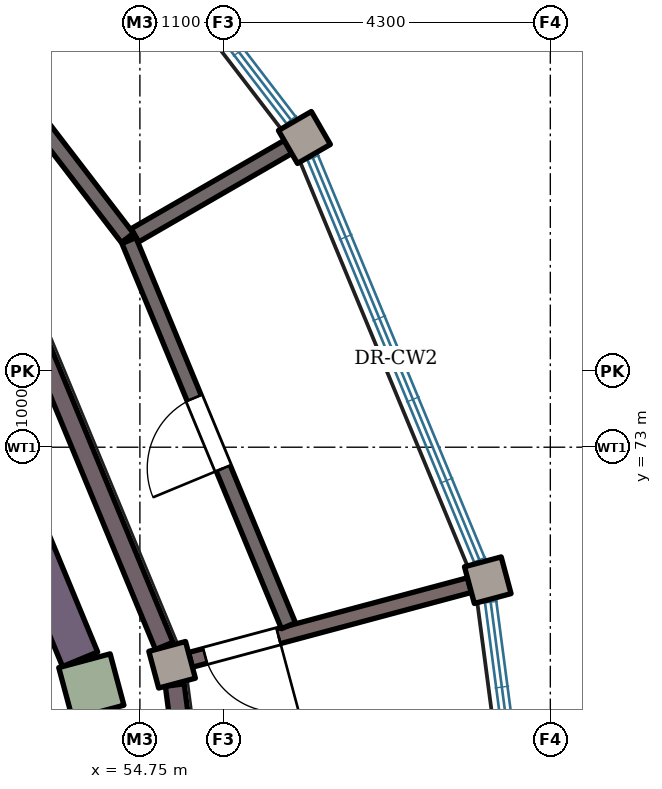
"""IFC4 building model, lengths in metres.
Left out: names, types, materials, properties, quantities, classifications, styles, units other than length and angle.
Written with IfcOpenShell. Run it as: python <this file> out.ifc"""

import sys

from ifc_helpers import new_model, si_unit, direction, frame, frame_2d, origin, origin_2d, place, context, subcontext, project, spatial, rectangle, extrude, element, fill, save


model = new_model("IFC4")
c1 = context("Model", 3, precision=1e-05, world=origin(), true_north=direction((0.0, 1.0)))
c2 = subcontext(c1, "Body", "Model", "MODEL_VIEW")
j1 = project(units=[si_unit("LENGTHUNIT", "METRE"), si_unit("PLANEANGLEUNIT", "RADIAN")], contexts=[c1])
p1 = place(None, origin())
s1 = spatial("IfcSite", under=j1, at=p1, CompositionType="ELEMENT")
p2 = place(p1, origin())
s2 = spatial("IfcBuilding", under=s1, at=p2, CompositionType="ELEMENT")
p3 = place(p2, frame((0.0, 0.0, 4.2)))
s3 = spatial("IfcBuildingStorey", under=s2, at=p3, CompositionType="ELEMENT", Elevation=4.2)
p4 = place(p3, frame((54.111, 69.853, 0.0), z_axis=(0.0, 0.0, 1.0), x_axis=(0.965925826289, 0.258819045103, 0.0)))
e1 = element("IfcColumn", 1, at=p4, inside=s3, PredefinedType="COLUMN", context=c2, shape_type="SweptSolid", body=[
    extrude(rectangle(XDim=0.7, YDim=0.7, at=origin_2d()), origin(), (0.0, 0.0, 1.0), 4.2),
])
p5 = place(p3, frame((53.963, 70.21, 0.0), z_axis=(0.0, 0.0, 1.0), x_axis=(-0.382688328955, 0.923877504262, 0.0)))
e2 = element("IfcWall", 2, at=p5, inside=s3, PredefinedType="SHEAR", context=c2, shape_type="SweptSolid", body=[
    extrude(rectangle(XDim=4.122, YDim=0.5, at=frame_2d((2.061, 0.0))), origin(), (0.0, 0.0, 1.0), 3.4),
])
for number, where, z_axis, x_axis in (
    (3, (55.174, 70.137, 0.0), (0.0, 0.0, 1.0), (0.966, 0.259, 0.0)),
    (4, (59.327, 71.25, 0.0), (0.0, 0.0, 1.0), (0.966, 0.259, 0.0)),
    (5, (56.915, 77.075, 0.0), (0.0, 0.0, 1.0), (0.866, 0.5, 0.0)),
):
    element("IfcColumn", number, at=place(p3, frame(where, z_axis=z_axis, x_axis=x_axis)), inside=s3, PredefinedType="COLUMN", context=c2, shape_type="SweptSolid", body=[
        extrude(rectangle(XDim=0.5, YDim=0.5, at=origin_2d()), origin(), (0.0, 0.0, 1.0), 4.2),
    ])
p6 = place(p3, frame((55.815, 65.267, 0.0), z_axis=(0.0, 0.0, 1.0), x_axis=(-0.130541551055, 0.991442839224, 0.0)))
e6 = element("IfcWall", 6, at=p6, inside=s3, PredefinedType="SHEAR", context=c2, shape_type="SweptSolid", body=[
    extrude(rectangle(XDim=4.644, YDim=0.25, at=frame_2d((2.322, 0.0))), origin(), (0.0, 0.0, 1.0), 3.6),
])
p7 = place(p3, frame((55.071, 70.386, 0.0), z_axis=(0.0, 0.0, 1.0), x_axis=(-0.382658268537, 0.923889955309, 0.0)))
e7 = element("IfcWall", 7, at=p7, inside=s3, PredefinedType="SHEAR", context=c2, shape_type="SweptSolid", body=[
    extrude(rectangle(XDim=4.644, YDim=0.25, at=frame_2d((2.322, 0.0))), origin(), (0.0, 0.0, 1.0), 3.6),
])
p8 = place(p2, origin())
s4 = spatial("IfcBuildingStorey", under=s2, at=p8, CompositionType="ELEMENT", Elevation=0.0)
p9 = place(p8, frame((44.0, 69.5, 0.0), z_axis=(0.0, 0.0, 1.0), x_axis=(1.0, 0.0, 0.0)))
e8 = element("IfcWall", 8, at=p9, inside=s4, PredefinedType="STANDARD", context=c2, shape_type="SweptSolid", body=[
    extrude(rectangle(XDim=9.906, YDim=0.35, at=frame_2d((4.953, 0.0))), origin(), (0.0, 0.0, 1.0), 24.5),
])
p10 = place(p3, frame((55.415, 70.202, 0.0), z_axis=(0.0, 0.0, 1.0), x_axis=(0.965919660258, 0.258842055948, 0.0)))
e9 = element("IfcWall", 9, at=p10, inside=s3, PredefinedType="STANDARD", context=c2, shape_type="SweptSolid", body=[
    extrude(rectangle(XDim=3.8, YDim=0.2, at=frame_2d((1.9, 0.0))), origin(), (0.0, 0.0, 1.0), 3.95),
])
p11 = place(p10, frame((0.2, 0.0, 0.0)))
e10 = element("IfcOpeningElement", 10, at=p11, cuts=e9, PredefinedType="OPENING", context=c2, shape_type="SweptSolid", body=[
    extrude(rectangle(XDim=1.0, YDim=2.1, at=frame_2d((0.5, 1.05))), frame((0.0, 0.11, 0.0), z_axis=(0.0, -1.0, 0.0), x_axis=(1.0, 0.0, 0.0)), (0.0, 0.0, 1.0), 0.22),
])
p12 = place(p3, frame((54.685, 75.788, 0.0), z_axis=(0.0, 0.0, 1.0), x_axis=(0.866056135553, 0.499946767237, 0.0)))
e11 = element("IfcWall", 11, at=p12, inside=s3, PredefinedType="PARTITIONING", context=c2, shape_type="SweptSolid", body=[
    extrude(rectangle(XDim=2.324, YDim=0.2, at=frame_2d((1.162, 0.0))), origin(), (0.0, 0.0, 1.0), 3.95),
])
p13 = place(p3, frame((56.705, 70.651, 0.0), z_axis=(0.0, 0.0, 1.0), x_axis=(-0.382696372992, 0.923874172222, 0.0)))
e12 = element("IfcWall", 12, at=p13, inside=s3, PredefinedType="PARTITIONING", context=c2, shape_type="SweptSolid", body=[
    extrude(rectangle(XDim=5.486, YDim=0.2, at=frame_2d((2.743, 0.0))), origin(), (0.0, 0.0, 1.0), 3.95),
])
p14 = place(p13, frame((2.243, 0.0, 0.0)))
e13 = element("IfcOpeningElement", 13, at=p14, cuts=e12, PredefinedType="OPENING", context=c2, shape_type="SweptSolid", body=[
    extrude(rectangle(XDim=1.0, YDim=2.1, at=frame_2d((0.5, 1.05))), frame((0.0, 0.11, 0.0), z_axis=(0.0, -1.0, 0.0), x_axis=(1.0, 0.0, 0.0)), (0.0, 0.0, 1.0), 0.22),
])
p15 = place(p3, frame((54.586, 75.753, 0.0), z_axis=(0.0, 0.0, 1.0), x_axis=(-0.608771278496, 0.793345782417, 0.0)))
e14 = element("IfcWall", 14, at=p15, inside=s3, PredefinedType="PARTITIONING", context=c2, shape_type="SweptSolid", body=[
    extrude(rectangle(XDim=5.566, YDim=0.2, at=frame_2d((2.783, 0.0))), origin(), (0.0, 0.0, 1.0), 3.95),
])
p16 = place(p11, origin())
e15 = element("IfcDoor", 15, at=p16, inside=s3, OperationType="SINGLE_SWING_RIGHT", PredefinedType="DOOR", context=c2, shape_type="SweptSolid", body=[
    extrude(rectangle(XDim=1.0, YDim=2.1, at=frame_2d((0.5, 1.05))), frame((0.0, 0.025, 0.0), z_axis=(0.0, -1.0, 0.0), x_axis=(1.0, 0.0, 0.0)), (0.0, 0.0, 1.0), 0.05),
])
fill(e10, e15)
p17 = place(p14, origin())
e16 = element("IfcDoor", 16, at=p17, inside=s3, OperationType="SINGLE_SWING_LEFT", PredefinedType="DOOR", context=c2, shape_type="SweptSolid", body=[
    extrude(rectangle(XDim=1.0, YDim=2.1, at=frame_2d((0.5, 1.05))), frame((0.0, 0.025, 0.0), z_axis=(0.0, -1.0, 0.0), x_axis=(1.0, 0.0, 0.0)), (0.0, 0.0, 1.0), 0.05),
])
fill(e13, e16)
save(model, sys.argv[1])
